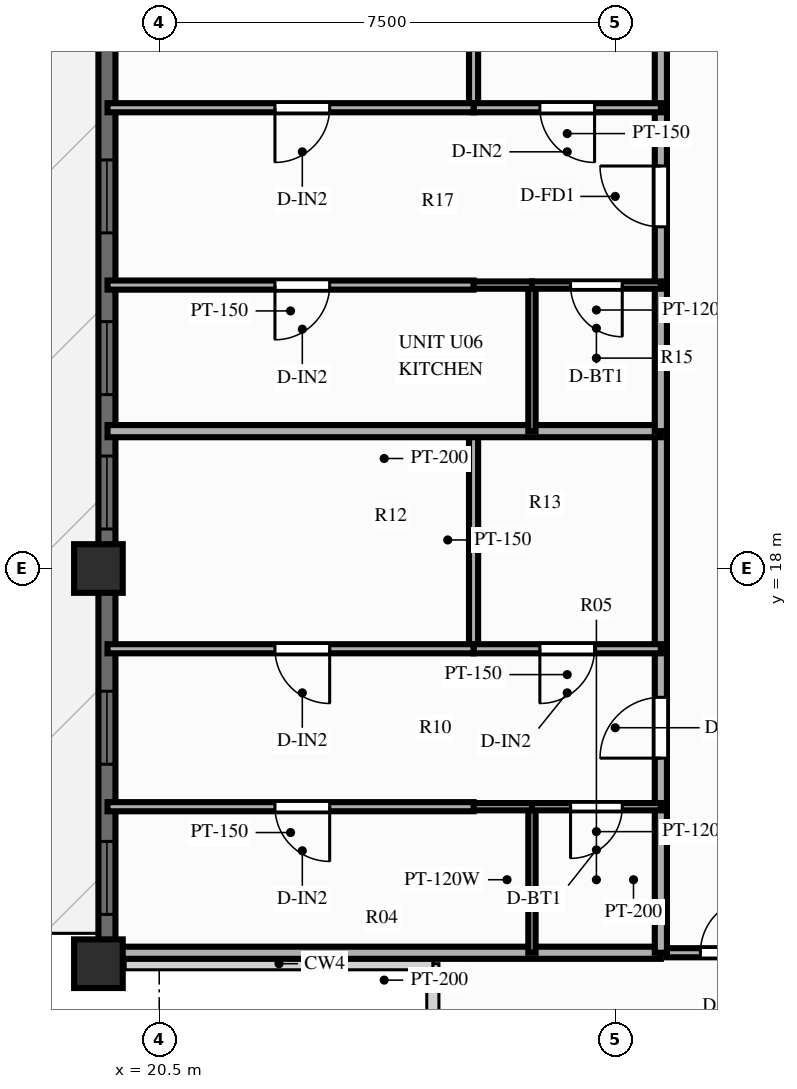
"""IFC4 building model, lengths in metres.
Left out: names, types, materials, properties, quantities, classifications, styles, units other than length and angle.
Written with IfcOpenShell. Run it as: python <this file> out.ifc"""

import sys

from ifc_helpers import new_model, si_unit, direction, frame, frame_2d, origin, origin_2d, place, context, subcontext, project, spatial, rectangle, extrude, source, transform, mapped, element, fill, save


model = new_model("IFC4")
c1 = context("Model", 3, precision=1e-05, world=origin(), true_north=direction((0.0, 1.0)))
c2 = subcontext(c1, "Body", "Model", "MODEL_VIEW")
j1 = project(units=[si_unit("LENGTHUNIT", "METRE"), si_unit("PLANEANGLEUNIT", "RADIAN")], contexts=[c1])
p1 = place(None, origin())
s1 = spatial("IfcSite", under=j1, at=p1, CompositionType="ELEMENT")
p2 = place(p1, origin())
s2 = spatial("IfcBuilding", under=s1, at=p2, CompositionType="ELEMENT")
p3 = place(p2, frame((0.0, 0.0, 196.6)))
s3 = spatial("IfcBuildingStorey", under=s2, at=p3, CompositionType="ELEMENT", Elevation=196.6)
m1 = source(origin(), c2, "Body", "SweptSolid", [
    extrude(rectangle(XDim=0.8, YDim=0.8, at=origin_2d()), origin(), (0.0, 0.0, 1.0), 3.0),
])
for number, where, z_axis, x_axis in (
    (1, (19.5, 18.0, 0.0), (0.0, 0.0, 1.0), (1.0, 0.0, 0.0)),
    (2, (19.5, 11.5, 0.0), (0.0, 0.0, 1.0), (1.0, 0.0, 0.0)),
):
    element("IfcColumn", number, at=place(p3, frame(where, z_axis=z_axis, x_axis=x_axis)), inside=s3, PredefinedType="COLUMN", context=c2, shape_type="MappedRepresentation", body=[
        mapped(m1, transform((0.0, 0.0, 0.0), scale=1.0)),
    ])
p4 = place(p3, frame((19.64, 11.5, 0.0), z_axis=(0.0, 0.0, 1.0), x_axis=(0.0, 1.0, 0.0)))
e3 = element("IfcWall", 3, at=p4, inside=s3, PredefinedType="SOLIDWALL", context=c2, shape_type="SweptSolid", body=[
    extrude(rectangle(XDim=31.0, YDim=0.28, at=frame_2d((15.5, 0.0))), origin(), (0.0, 0.0, 1.0), 2.28),
])
p5 = place(p4, frame((0.811, 0.0, 0.25)))
e4 = element("IfcOpeningElement", 4, at=p5, cuts=e3, PredefinedType="OPENING", context=c2, shape_type="SweptSolid", body=[
    extrude(rectangle(XDim=1.2, YDim=1.5, at=frame_2d((0.6, 0.75))), frame((0.0, 0.152, 0.0), z_axis=(0.0, -1.0, 0.0), x_axis=(1.0, 0.0, 0.0)), (0.0, 0.0, 1.0), 0.304),
])
p6 = place(p4, frame((3.281, 0.0, 0.25)))
e5 = element("IfcOpeningElement", 5, at=p6, cuts=e3, PredefinedType="OPENING", context=c2, shape_type="SweptSolid", body=[
    extrude(rectangle(XDim=1.2, YDim=1.5, at=frame_2d((0.6, 0.75))), frame((0.0, 0.152, 0.0), z_axis=(0.0, -1.0, 0.0), x_axis=(1.0, 0.0, 0.0)), (0.0, 0.0, 1.0), 0.304),
])
p7 = place(p4, frame((7.15, 0.0, 0.25)))
e6 = element("IfcOpeningElement", 6, at=p7, cuts=e3, PredefinedType="OPENING", context=c2, shape_type="SweptSolid", body=[
    extrude(rectangle(XDim=1.2, YDim=1.5, at=frame_2d((0.6, 0.75))), frame((0.0, 0.152, 0.0), z_axis=(0.0, -1.0, 0.0), x_axis=(1.0, 0.0, 0.0)), (0.0, 0.0, 1.0), 0.304),
])
p8 = place(p4, frame((9.36, 0.0, 0.25)))
e7 = element("IfcOpeningElement", 7, at=p8, cuts=e3, PredefinedType="OPENING", context=c2, shape_type="SweptSolid", body=[
    extrude(rectangle(XDim=1.2, YDim=1.5, at=frame_2d((0.6, 0.75))), frame((0.0, 0.152, 0.0), z_axis=(0.0, -1.0, 0.0), x_axis=(1.0, 0.0, 0.0)), (0.0, 0.0, 1.0), 0.304),
])
p9 = place(p4, frame((12.02, 0.0, 0.25)))
e8 = element("IfcOpeningElement", 8, at=p9, cuts=e3, PredefinedType="OPENING", context=c2, shape_type="SweptSolid", body=[
    extrude(rectangle(XDim=1.2, YDim=1.5, at=frame_2d((0.6, 0.75))), frame((0.0, 0.152, 0.0), z_axis=(0.0, -1.0, 0.0), x_axis=(1.0, 0.0, 0.0)), (0.0, 0.0, 1.0), 0.304),
])
p10 = place(p4, frame((15.108, 0.0, 0.25)))
e9 = element("IfcOpeningElement", 9, at=p10, cuts=e3, PredefinedType="OPENING", context=c2, shape_type="SweptSolid", body=[
    extrude(rectangle(XDim=1.2, YDim=1.5, at=frame_2d((0.6, 0.75))), frame((0.0, 0.152, 0.0), z_axis=(0.0, -1.0, 0.0), x_axis=(1.0, 0.0, 0.0)), (0.0, 0.0, 1.0), 0.304),
])
p11 = place(p4, frame((18.484, 0.0, 0.0)))
e10 = element("IfcOpeningElement", 10, at=p11, cuts=e3, PredefinedType="OPENING", context=c2, shape_type="SweptSolid", body=[
    extrude(rectangle(XDim=1.6, YDim=2.15, at=frame_2d((0.8, 1.075))), frame((0.0, 0.152, 0.0), z_axis=(0.0, -1.0, 0.0), x_axis=(1.0, 0.0, 0.0)), (0.0, 0.0, 1.0), 0.304),
])
p12 = place(p4, frame((22.054, 0.0, 0.25)))
e11 = element("IfcOpeningElement", 11, at=p12, cuts=e3, PredefinedType="OPENING", context=c2, shape_type="SweptSolid", body=[
    extrude(rectangle(XDim=1.2, YDim=1.5, at=frame_2d((0.6, 0.75))), frame((0.0, 0.152, 0.0), z_axis=(0.0, -1.0, 0.0), x_axis=(1.0, 0.0, 0.0)), (0.0, 0.0, 1.0), 0.304),
])
p13 = place(p4, frame((25.235, 0.0, 0.25)))
e12 = element("IfcOpeningElement", 12, at=p13, cuts=e3, PredefinedType="OPENING", context=c2, shape_type="SweptSolid", body=[
    extrude(rectangle(XDim=1.2, YDim=1.5, at=frame_2d((0.6, 0.75))), frame((0.0, 0.152, 0.0), z_axis=(0.0, -1.0, 0.0), x_axis=(1.0, 0.0, 0.0)), (0.0, 0.0, 1.0), 0.304),
])
p14 = place(p4, frame((28.245, 0.0, 0.25)))
e13 = element("IfcOpeningElement", 13, at=p14, cuts=e3, PredefinedType="OPENING", context=c2, shape_type="SweptSolid", body=[
    extrude(rectangle(XDim=1.2, YDim=1.5, at=frame_2d((0.6, 0.75))), frame((0.0, 0.152, 0.0), z_axis=(0.0, -1.0, 0.0), x_axis=(1.0, 0.0, 0.0)), (0.0, 0.0, 1.0), 0.304),
])
p15 = place(p3, frame((28.85, 11.68, 0.0), z_axis=(0.0, 0.0, 1.0), x_axis=(1.0, 0.0, 0.0)))
e14 = element("IfcWall", 14, at=p15, inside=s3, PredefinedType="PARTITIONING", context=c2, shape_type="SweptSolid", body=[
    extrude(rectangle(XDim=2.33, YDim=0.15, at=frame_2d((1.165, 0.0))), origin(), (0.0, 0.0, 1.0), 2.79),
])
p16 = place(p15, frame((0.55, 0.0, 0.0)))
e15 = element("IfcOpeningElement", 15, at=p16, cuts=e14, PredefinedType="OPENING", context=c2, shape_type="SweptSolid", body=[
    extrude(rectangle(XDim=0.9, YDim=2.1, at=frame_2d((0.45, 1.05))), frame((0.0, 0.087, 0.0), z_axis=(0.0, -1.0, 0.0), x_axis=(1.0, 0.0, 0.0)), (0.0, 0.0, 1.0), 0.174),
])
p17 = place(p3, frame((28.75, 11.68, 0.0), z_axis=(0.0, 0.0, 1.0), x_axis=(-1.0, 0.0, 0.0)))
e16 = element("IfcWall", 16, at=p17, inside=s3, PredefinedType="PARTITIONING", context=c2, shape_type="SweptSolid", body=[
    extrude(rectangle(XDim=9.1, YDim=0.2, at=frame_2d((4.55, 0.0))), origin(), (0.0, 0.0, 1.0), 2.79),
])
p18 = place(p3, frame((28.75, 11.68, 0.0), z_axis=(0.0, 0.0, 1.0), x_axis=(0.0, 1.0, 0.0)))
e17 = element("IfcWall", 17, at=p18, inside=s3, PredefinedType="PARTITIONING", context=c2, shape_type="SweptSolid", body=[
    extrude(rectangle(XDim=2.402, YDim=0.2, at=frame_2d((1.201, 0.0))), origin(), (0.0, 0.0, 1.0), 2.79),
])
p19 = place(p3, frame((28.75, 14.082, 0.0), z_axis=(0.0, 0.0, 1.0), x_axis=(0.0, 1.0, 0.0)))
e18 = element("IfcWall", 18, at=p19, inside=s3, PredefinedType="PARTITIONING", context=c2, shape_type="SweptSolid", body=[
    extrude(rectangle(XDim=2.598, YDim=0.2, at=frame_2d((1.299, 0.0))), origin(), (0.0, 0.0, 1.0), 2.79),
])
p20 = place(p19, frame((0.799, 0.0, 0.0)))
e19 = element("IfcOpeningElement", 19, at=p20, cuts=e18, PredefinedType="OPENING", context=c2, shape_type="SweptSolid", body=[
    extrude(rectangle(XDim=1.0, YDim=2.15, at=frame_2d((0.5, 1.075))), frame((0.0, 0.112, 0.0), z_axis=(0.0, -1.0, 0.0), x_axis=(1.0, 0.0, 0.0)), (0.0, 0.0, 1.0), 0.224),
])
p21 = place(p3, frame((28.75, 16.68, 0.0), z_axis=(0.0, 0.0, 1.0), x_axis=(0.0, 1.0, 0.0)))
e20 = element("IfcWall", 20, at=p21, inside=s3, PredefinedType="PARTITIONING", context=c2, shape_type="SweptSolid", body=[
    extrude(rectangle(XDim=3.579, YDim=0.2, at=frame_2d((1.79, 0.0))), origin(), (0.0, 0.0, 1.0), 2.79),
])
p22 = place(p3, frame((26.63, 11.68, 0.0), z_axis=(0.0, 0.0, 1.0), x_axis=(0.0, 1.0, 0.0)))
e21 = element("IfcWall", 21, at=p22, inside=s3, PredefinedType="PARTITIONING", context=c2, shape_type="SweptSolid", body=[
    extrude(rectangle(XDim=2.402, YDim=0.12, at=frame_2d((1.201, 0.0))), origin(), (0.0, 0.0, 1.0), 2.79),
])
p23 = place(p3, frame((25.67, 16.68, 0.0), z_axis=(0.0, 0.0, 1.0), x_axis=(0.0, 1.0, 0.0)))
e22 = element("IfcWall", 22, at=p23, inside=s3, PredefinedType="PARTITIONING", context=c2, shape_type="SweptSolid", body=[
    extrude(rectangle(XDim=3.579, YDim=0.15, at=frame_2d((1.79, 0.0))), origin(), (0.0, 0.0, 1.0), 2.49),
])
p24 = place(p3, frame((28.75, 14.082, 0.0), z_axis=(0.0, 0.0, 1.0), x_axis=(-1.0, 0.0, 0.0)))
e23 = element("IfcWall", 23, at=p24, inside=s3, PredefinedType="PARTITIONING", context=c2, shape_type="SweptSolid", body=[
    extrude(rectangle(XDim=2.12, YDim=0.12, at=frame_2d((1.06, 0.0))), origin(), (0.0, 0.0, 1.0), 2.79),
])
p25 = place(p24, frame((0.635, 0.0, 0.0)))
e24 = element("IfcOpeningElement", 24, at=p25, cuts=e23, PredefinedType="OPENING", context=c2, shape_type="SweptSolid", body=[
    extrude(rectangle(XDim=0.85, YDim=2.05, at=frame_2d((0.425, 1.025))), frame((0.0, 0.072, 0.0), z_axis=(0.0, -1.0, 0.0), x_axis=(1.0, 0.0, 0.0)), (0.0, 0.0, 1.0), 0.144),
])
p26 = place(p3, frame((26.63, 14.082, 0.0), z_axis=(0.0, 0.0, 1.0), x_axis=(-1.0, 0.0, 0.0)))
e25 = element("IfcWall", 25, at=p26, inside=s3, PredefinedType="PARTITIONING", context=c2, shape_type="SweptSolid", body=[
    extrude(rectangle(XDim=0.96, YDim=0.12, at=frame_2d((0.48, 0.0))), origin(), (0.0, 0.0, 1.0), 2.79),
])
p27 = place(p3, frame((25.67, 14.082, 0.0), z_axis=(0.0, 0.0, 1.0), x_axis=(-1.0, 0.0, 0.0)))
e26 = element("IfcWall", 26, at=p27, inside=s3, PredefinedType="PARTITIONING", context=c2, shape_type="SweptSolid", body=[
    extrude(rectangle(XDim=6.02, YDim=0.15, at=frame_2d((3.01, 0.0))), origin(), (0.0, 0.0, 1.0), 2.79),
])
p28 = place(p27, frame((2.367, 0.0, 0.0)))
e27 = element("IfcOpeningElement", 27, at=p28, cuts=e26, PredefinedType="OPENING", context=c2, shape_type="SweptSolid", body=[
    extrude(rectangle(XDim=0.9, YDim=2.1, at=frame_2d((0.45, 1.05))), frame((0.0, 0.087, 0.0), z_axis=(0.0, -1.0, 0.0), x_axis=(1.0, 0.0, 0.0)), (0.0, 0.0, 1.0), 0.174),
])
p29 = place(p3, frame((28.75, 16.68, 0.0), z_axis=(0.0, 0.0, 1.0), x_axis=(-1.0, 0.0, 0.0)))
e28 = element("IfcWall", 28, at=p29, inside=s3, PredefinedType="PARTITIONING", context=c2, shape_type="SweptSolid", body=[
    extrude(rectangle(XDim=3.08, YDim=0.15, at=frame_2d((1.54, 0.0))), origin(), (0.0, 0.0, 1.0), 2.79),
])
p30 = place(p29, frame((1.09, 0.0, 0.0)))
e29 = element("IfcOpeningElement", 29, at=p30, cuts=e28, PredefinedType="OPENING", context=c2, shape_type="SweptSolid", body=[
    extrude(rectangle(XDim=0.9, YDim=2.1, at=frame_2d((0.45, 1.05))), frame((0.0, 0.087, 0.0), z_axis=(0.0, -1.0, 0.0), x_axis=(1.0, 0.0, 0.0)), (0.0, 0.0, 1.0), 0.174),
])
p31 = place(p3, frame((25.67, 16.68, 0.0), z_axis=(0.0, 0.0, 1.0), x_axis=(-1.0, 0.0, 0.0)))
e30 = element("IfcWall", 30, at=p31, inside=s3, PredefinedType="PARTITIONING", context=c2, shape_type="SweptSolid", body=[
    extrude(rectangle(XDim=6.02, YDim=0.15, at=frame_2d((3.01, 0.0))), origin(), (0.0, 0.0, 1.0), 2.79),
])
p32 = place(p31, frame((2.367, 0.0, 0.0)))
e31 = element("IfcOpeningElement", 31, at=p32, cuts=e30, PredefinedType="OPENING", context=c2, shape_type="SweptSolid", body=[
    extrude(rectangle(XDim=0.9, YDim=2.1, at=frame_2d((0.45, 1.05))), frame((0.0, 0.087, 0.0), z_axis=(0.0, -1.0, 0.0), x_axis=(1.0, 0.0, 0.0)), (0.0, 0.0, 1.0), 0.174),
])
p33 = place(p3, frame((28.75, 20.259, 0.0), z_axis=(0.0, 0.0, 1.0), x_axis=(-1.0, 0.0, 0.0)))
e32 = element("IfcWall", 32, at=p33, inside=s3, PredefinedType="PARTITIONING", context=c2, shape_type="SweptSolid", body=[
    extrude(rectangle(XDim=9.1, YDim=0.2, at=frame_2d((4.55, 0.0))), origin(), (0.0, 0.0, 1.0), 2.79),
])
p34 = place(p3, frame((28.75, 20.259, 0.0), z_axis=(0.0, 0.0, 1.0), x_axis=(0.0, 1.0, 0.0)))
e33 = element("IfcWall", 33, at=p34, inside=s3, PredefinedType="PARTITIONING", context=c2, shape_type="SweptSolid", body=[
    extrude(rectangle(XDim=2.402, YDim=0.2, at=frame_2d((1.201, 0.0))), origin(), (0.0, 0.0, 1.0), 2.79),
])
p35 = place(p3, frame((28.75, 22.661, 0.0), z_axis=(0.0, 0.0, 1.0), x_axis=(0.0, 1.0, 0.0)))
e34 = element("IfcWall", 34, at=p35, inside=s3, PredefinedType="PARTITIONING", context=c2, shape_type="SweptSolid", body=[
    extrude(rectangle(XDim=2.917, YDim=0.2, at=frame_2d((1.458, 0.0))), origin(), (0.0, 0.0, 1.0), 2.79),
])
p36 = place(p35, frame((0.958, 0.0, 0.0)))
e35 = element("IfcOpeningElement", 35, at=p36, cuts=e34, PredefinedType="OPENING", context=c2, shape_type="SweptSolid", body=[
    extrude(rectangle(XDim=1.0, YDim=2.15, at=frame_2d((0.5, 1.075))), frame((0.0, 0.112, 0.0), z_axis=(0.0, -1.0, 0.0), x_axis=(1.0, 0.0, 0.0)), (0.0, 0.0, 1.0), 0.224),
])
p37 = place(p3, frame((28.75, 25.578, 0.0), z_axis=(0.0, 0.0, 1.0), x_axis=(0.0, 1.0, 0.0)))
e36 = element("IfcWall", 36, at=p37, inside=s3, PredefinedType="PARTITIONING", context=c2, shape_type="SweptSolid", body=[
    extrude(rectangle(XDim=3.26, YDim=0.2, at=frame_2d((1.63, 0.0))), origin(), (0.0, 0.0, 1.0), 2.79),
])
p38 = place(p3, frame((26.63, 20.259, 0.0), z_axis=(0.0, 0.0, 1.0), x_axis=(0.0, 1.0, 0.0)))
e37 = element("IfcWall", 37, at=p38, inside=s3, PredefinedType="PARTITIONING", context=c2, shape_type="SweptSolid", body=[
    extrude(rectangle(XDim=2.402, YDim=0.12, at=frame_2d((1.201, 0.0))), origin(), (0.0, 0.0, 1.0), 2.79),
])
p39 = place(p3, frame((25.67, 25.578, 0.0), z_axis=(0.0, 0.0, 1.0), x_axis=(0.0, 1.0, 0.0)))
e38 = element("IfcWall", 38, at=p39, inside=s3, PredefinedType="PARTITIONING", context=c2, shape_type="SweptSolid", body=[
    extrude(rectangle(XDim=3.26, YDim=0.15, at=frame_2d((1.63, 0.0))), origin(), (0.0, 0.0, 1.0), 2.49),
])
p40 = place(p3, frame((28.75, 22.661, 0.0), z_axis=(0.0, 0.0, 1.0), x_axis=(-1.0, 0.0, 0.0)))
e39 = element("IfcWall", 39, at=p40, inside=s3, PredefinedType="PARTITIONING", context=c2, shape_type="SweptSolid", body=[
    extrude(rectangle(XDim=2.12, YDim=0.12, at=frame_2d((1.06, 0.0))), origin(), (0.0, 0.0, 1.0), 2.79),
])
p41 = place(p40, frame((0.635, 0.0, 0.0)))
e40 = element("IfcOpeningElement", 40, at=p41, cuts=e39, PredefinedType="OPENING", context=c2, shape_type="SweptSolid", body=[
    extrude(rectangle(XDim=0.85, YDim=2.05, at=frame_2d((0.425, 1.025))), frame((0.0, 0.072, 0.0), z_axis=(0.0, -1.0, 0.0), x_axis=(1.0, 0.0, 0.0)), (0.0, 0.0, 1.0), 0.144),
])
p42 = place(p3, frame((26.63, 22.661, 0.0), z_axis=(0.0, 0.0, 1.0), x_axis=(-1.0, 0.0, 0.0)))
e41 = element("IfcWall", 41, at=p42, inside=s3, PredefinedType="PARTITIONING", context=c2, shape_type="SweptSolid", body=[
    extrude(rectangle(XDim=0.96, YDim=0.12, at=frame_2d((0.48, 0.0))), origin(), (0.0, 0.0, 1.0), 2.79),
])
p43 = place(p3, frame((25.67, 22.661, 0.0), z_axis=(0.0, 0.0, 1.0), x_axis=(-1.0, 0.0, 0.0)))
e42 = element("IfcWall", 42, at=p43, inside=s3, PredefinedType="PARTITIONING", context=c2, shape_type="SweptSolid", body=[
    extrude(rectangle(XDim=6.02, YDim=0.15, at=frame_2d((3.01, 0.0))), origin(), (0.0, 0.0, 1.0), 2.79),
])
p44 = place(p43, frame((2.367, 0.0, 0.0)))
e43 = element("IfcOpeningElement", 43, at=p44, cuts=e42, PredefinedType="OPENING", context=c2, shape_type="SweptSolid", body=[
    extrude(rectangle(XDim=0.9, YDim=2.1, at=frame_2d((0.45, 1.05))), frame((0.0, 0.087, 0.0), z_axis=(0.0, -1.0, 0.0), x_axis=(1.0, 0.0, 0.0)), (0.0, 0.0, 1.0), 0.174),
])
p45 = place(p3, frame((28.75, 25.578, 0.0), z_axis=(0.0, 0.0, 1.0), x_axis=(-1.0, 0.0, 0.0)))
e44 = element("IfcWall", 44, at=p45, inside=s3, PredefinedType="PARTITIONING", context=c2, shape_type="SweptSolid", body=[
    extrude(rectangle(XDim=3.08, YDim=0.15, at=frame_2d((1.54, 0.0))), origin(), (0.0, 0.0, 1.0), 2.79),
])
p46 = place(p45, frame((1.09, 0.0, 0.0)))
e45 = element("IfcOpeningElement", 45, at=p46, cuts=e44, PredefinedType="OPENING", context=c2, shape_type="SweptSolid", body=[
    extrude(rectangle(XDim=0.9, YDim=2.1, at=frame_2d((0.45, 1.05))), frame((0.0, 0.087, 0.0), z_axis=(0.0, -1.0, 0.0), x_axis=(1.0, 0.0, 0.0)), (0.0, 0.0, 1.0), 0.174),
])
p47 = place(p3, frame((25.67, 25.578, 0.0), z_axis=(0.0, 0.0, 1.0), x_axis=(-1.0, 0.0, 0.0)))
e46 = element("IfcWall", 46, at=p47, inside=s3, PredefinedType="PARTITIONING", context=c2, shape_type="SweptSolid", body=[
    extrude(rectangle(XDim=6.02, YDim=0.15, at=frame_2d((3.01, 0.0))), origin(), (0.0, 0.0, 1.0), 2.79),
])
p48 = place(p47, frame((2.367, 0.0, 0.0)))
e47 = element("IfcOpeningElement", 47, at=p48, cuts=e46, PredefinedType="OPENING", context=c2, shape_type="SweptSolid", body=[
    extrude(rectangle(XDim=0.9, YDim=2.1, at=frame_2d((0.45, 1.05))), frame((0.0, 0.087, 0.0), z_axis=(0.0, -1.0, 0.0), x_axis=(1.0, 0.0, 0.0)), (0.0, 0.0, 1.0), 0.174),
])
m2 = source(origin(), c2, "Body", "SweptSolid", [
    extrude(rectangle(XDim=1.2, YDim=1.5, at=frame_2d((0.6, 0.75))), frame((0.0, 0.03, 0.0), z_axis=(0.0, -1.0, 0.0), x_axis=(1.0, 0.0, 0.0)), (0.0, 0.0, 1.0), 0.06),
])
p49 = place(p5, origin())
e48 = element("IfcWindow", 48, at=p49, inside=s3, PartitioningType="SINGLE_PANEL", PredefinedType="WINDOW", context=c2, shape_type="MappedRepresentation", body=[
    mapped(m2, transform((0.0, 0.0, 0.0), scale=1.0)),
])
fill(e4, e48)
p50 = place(p6, origin())
e49 = element("IfcWindow", 49, at=p50, inside=s3, PartitioningType="SINGLE_PANEL", PredefinedType="WINDOW", context=c2, shape_type="MappedRepresentation", body=[
    mapped(m2, transform((0.0, 0.0, 0.0), scale=1.0)),
])
fill(e5, e49)
p51 = place(p7, origin())
e50 = element("IfcWindow", 50, at=p51, inside=s3, PartitioningType="SINGLE_PANEL", PredefinedType="WINDOW", context=c2, shape_type="MappedRepresentation", body=[
    mapped(m2, transform((0.0, 0.0, 0.0), scale=1.0)),
])
fill(e6, e50)
p52 = place(p8, origin())
e51 = element("IfcWindow", 51, at=p52, inside=s3, PartitioningType="SINGLE_PANEL", PredefinedType="WINDOW", context=c2, shape_type="MappedRepresentation", body=[
    mapped(m2, transform((0.0, 0.0, 0.0), scale=1.0)),
])
fill(e7, e51)
p53 = place(p9, origin())
e52 = element("IfcWindow", 52, at=p53, inside=s3, PartitioningType="SINGLE_PANEL", PredefinedType="WINDOW", context=c2, shape_type="MappedRepresentation", body=[
    mapped(m2, transform((0.0, 0.0, 0.0), scale=1.0)),
])
fill(e8, e52)
m3 = source(origin(), c2, "Body", "SweptSolid", [
    extrude(rectangle(XDim=0.9, YDim=2.1, at=frame_2d((0.45, 1.05))), frame((0.0, 0.025, 0.0), z_axis=(0.0, -1.0, 0.0), x_axis=(1.0, 0.0, 0.0)), (0.0, 0.0, 1.0), 0.05),
])
p54 = place(p16, origin())
e53 = element("IfcDoor", 53, at=p54, inside=s3, OperationType="SINGLE_SWING_RIGHT", PredefinedType="DOOR", context=c2, shape_type="MappedRepresentation", body=[
    mapped(m3, transform((0.0, 0.0, 0.0), scale=1.0)),
])
fill(e15, e53)
m4 = source(origin(), c2, "Body", "SweptSolid", [
    extrude(rectangle(XDim=1.0, YDim=2.15, at=frame_2d((0.5, 1.075))), frame((0.0, 0.025, 0.0), z_axis=(0.0, -1.0, 0.0), x_axis=(1.0, 0.0, 0.0)), (0.0, 0.0, 1.0), 0.05),
])
p55 = place(p20, origin())
e54 = element("IfcDoor", 54, at=p55, inside=s3, OperationType="SINGLE_SWING_LEFT", PredefinedType="DOOR", context=c2, shape_type="MappedRepresentation", body=[
    mapped(m4, transform((0.0, 0.0, 0.0), scale=1.0)),
])
fill(e19, e54)
m5 = source(origin(), c2, "Body", "SweptSolid", [
    extrude(rectangle(XDim=0.85, YDim=2.05, at=frame_2d((0.425, 1.025))), frame((0.0, 0.025, 0.0), z_axis=(0.0, -1.0, 0.0), x_axis=(1.0, 0.0, 0.0)), (0.0, 0.0, 1.0), 0.05),
])
p56 = place(p25, origin())
e55 = element("IfcDoor", 55, at=p56, inside=s3, OperationType="SINGLE_SWING_RIGHT", PredefinedType="DOOR", context=c2, shape_type="MappedRepresentation", body=[
    mapped(m5, transform((0.0, 0.0, 0.0), scale=1.0)),
])
fill(e24, e55)
p57 = place(p28, origin())
e56 = element("IfcDoor", 56, at=p57, inside=s3, OperationType="SINGLE_SWING_LEFT", PredefinedType="DOOR", context=c2, shape_type="MappedRepresentation", body=[
    mapped(m3, transform((0.0, 0.0, 0.0), scale=1.0)),
])
fill(e27, e56)
p58 = place(p30, origin())
e57 = element("IfcDoor", 57, at=p58, inside=s3, OperationType="SINGLE_SWING_RIGHT", PredefinedType="DOOR", context=c2, shape_type="MappedRepresentation", body=[
    mapped(m3, transform((0.0, 0.0, 0.0), scale=1.0)),
])
fill(e29, e57)
p59 = place(p32, origin())
e58 = element("IfcDoor", 58, at=p59, inside=s3, OperationType="SINGLE_SWING_LEFT", PredefinedType="DOOR", context=c2, shape_type="MappedRepresentation", body=[
    mapped(m3, transform((0.0, 0.0, 0.0), scale=1.0)),
])
fill(e31, e58)
p60 = place(p36, origin())
e59 = element("IfcDoor", 59, at=p60, inside=s3, OperationType="SINGLE_SWING_RIGHT", PredefinedType="DOOR", context=c2, shape_type="MappedRepresentation", body=[
    mapped(m4, transform((0.0, 0.0, 0.0), scale=1.0)),
])
fill(e35, e59)
p61 = place(p41, origin())
e60 = element("IfcDoor", 60, at=p61, inside=s3, OperationType="SINGLE_SWING_LEFT", PredefinedType="DOOR", context=c2, shape_type="MappedRepresentation", body=[
    mapped(m5, transform((0.0, 0.0, 0.0), scale=1.0)),
])
fill(e40, e60)
p62 = place(p44, origin())
e61 = element("IfcDoor", 61, at=p62, inside=s3, OperationType="SINGLE_SWING_RIGHT", PredefinedType="DOOR", context=c2, shape_type="MappedRepresentation", body=[
    mapped(m3, transform((0.0, 0.0, 0.0), scale=1.0)),
])
fill(e43, e61)
p63 = place(p46, origin())
e62 = element("IfcDoor", 62, at=p63, inside=s3, OperationType="SINGLE_SWING_LEFT", PredefinedType="DOOR", context=c2, shape_type="MappedRepresentation", body=[
    mapped(m3, transform((0.0, 0.0, 0.0), scale=1.0)),
])
fill(e45, e62)
p64 = place(p48, origin())
e63 = element("IfcDoor", 63, at=p64, inside=s3, OperationType="SINGLE_SWING_RIGHT", PredefinedType="DOOR", context=c2, shape_type="MappedRepresentation", body=[
    mapped(m3, transform((0.0, 0.0, 0.0), scale=1.0)),
])
fill(e47, e63)
save(model, sys.argv[1])
